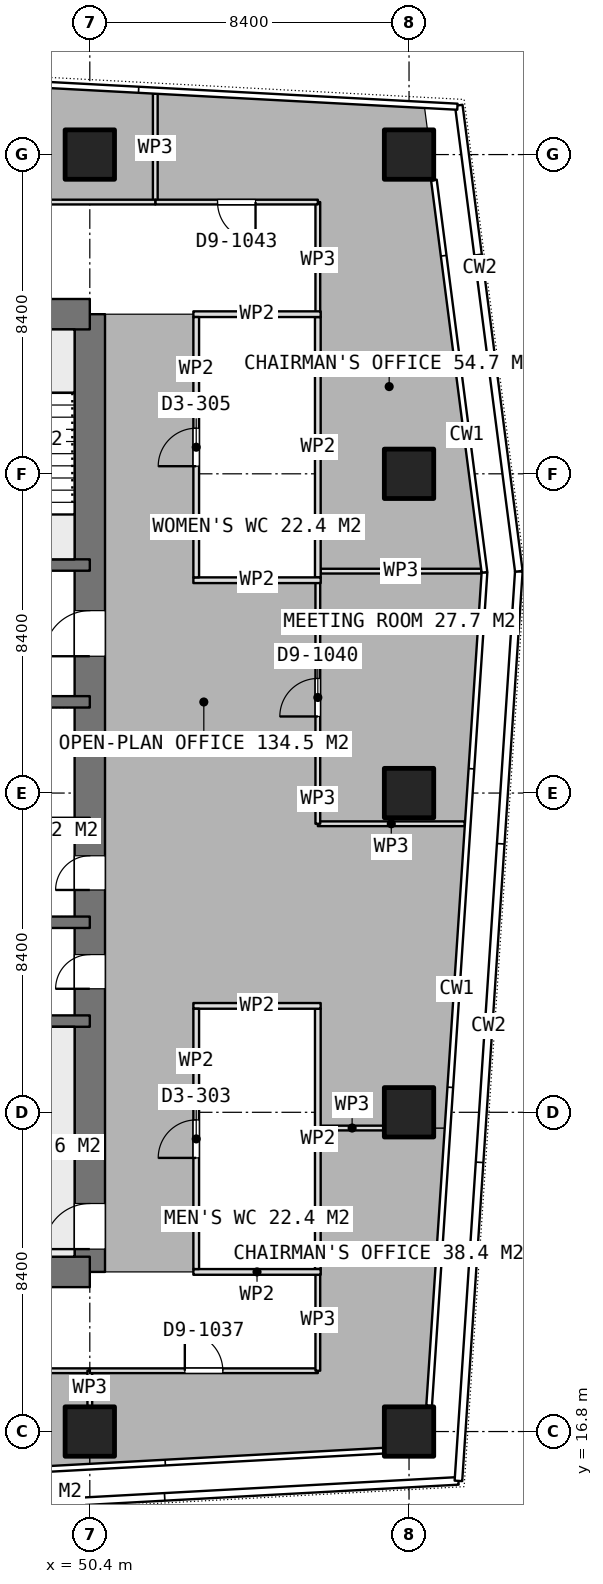
"""IFC4 building model, lengths in metres.
Left out: names, types, materials, properties, quantities, classifications, styles, units other than length and angle.
Written with IfcOpenShell. Run it as: python <this file> out.ifc"""

import sys

from ifc_helpers import new_model, si_unit, direction, frame, frame_2d, origin, origin_2d, place, context, subcontext, project, spatial, rectangle, extrude, element, fill, save


model = new_model("IFC4")
c1 = context("Model", 3, precision=1e-05, world=origin(), true_north=direction((0.0, 1.0)))
c2 = subcontext(c1, "Body", "Model", "MODEL_VIEW")
j1 = project(units=[si_unit("LENGTHUNIT", "METRE"), si_unit("PLANEANGLEUNIT", "RADIAN")], contexts=[c1])
p1 = place(None, origin())
s1 = spatial("IfcSite", under=j1, at=p1, CompositionType="ELEMENT")
p2 = place(p1, origin())
s2 = spatial("IfcBuilding", under=s1, at=p2, CompositionType="ELEMENT")
p3 = place(p2, frame((0.0, 0.0, 280.1)))
s3 = spatial("IfcBuildingStorey", under=s2, at=p3, CompositionType="ELEMENT", Elevation=280.1)
for number, where, z_axis, x_axis in (
    (1, (40.0, 21.0, 0.0), (0.0, 0.0, 1.0), (1.0, 0.0, 0.0)),
    (2, (40.0, 46.2, 0.0), (0.0, 0.0, 1.0), (1.0, 0.0, 0.0)),
):
    element("IfcWall", number, at=place(p3, frame(where, z_axis=z_axis, x_axis=x_axis)), inside=s3, PredefinedType="SHEAR", context=c2, shape_type="SweptSolid", body=[
        extrude(rectangle(XDim=10.4, YDim=0.8, at=frame_2d((5.2, 0.0))), origin(), (0.0, 0.0, 1.0), 3.75),
    ])
p4 = place(p3, frame((50.4, 21.0, 0.0), z_axis=(0.0, 0.0, 1.0), x_axis=(0.0, 1.0, 0.0)))
e3 = element("IfcWall", 3, at=p4, inside=s3, PredefinedType="SHEAR", context=c2, shape_type="SweptSolid", body=[
    extrude(rectangle(XDim=25.2, YDim=0.8, at=frame_2d((12.6, 0.0))), origin(), (0.0, 0.0, 1.0), 3.75),
])
p5 = place(p4, frame((16.2, 0.0, 0.0)))
e4 = element("IfcOpeningElement", 4, at=p5, cuts=e3, PredefinedType="OPENING", context=c2, shape_type="SweptSolid", body=[
    extrude(rectangle(XDim=1.2, YDim=2.1, at=frame_2d((0.6, 1.05))), frame((0.0, 0.41, 0.0), z_axis=(0.0, -1.0, 0.0), x_axis=(1.0, 0.0, 0.0)), (0.0, 0.0, 1.0), 0.82),
])
p6 = place(p4, frame((10.05, 0.0, 0.0)))
e5 = element("IfcOpeningElement", 5, at=p6, cuts=e3, PredefinedType="OPENING", context=c2, shape_type="SweptSolid", body=[
    extrude(rectangle(XDim=0.9, YDim=2.1, at=frame_2d((0.45, 1.05))), frame((0.0, 0.41, 0.0), z_axis=(0.0, -1.0, 0.0), x_axis=(1.0, 0.0, 0.0)), (0.0, 0.0, 1.0), 0.82),
])
p7 = place(p4, frame((7.45, 0.0, 0.0)))
e6 = element("IfcOpeningElement", 6, at=p7, cuts=e3, PredefinedType="OPENING", context=c2, shape_type="SweptSolid", body=[
    extrude(rectangle(XDim=0.9, YDim=2.1, at=frame_2d((0.45, 1.05))), frame((0.0, 0.41, 0.0), z_axis=(0.0, -1.0, 0.0), x_axis=(1.0, 0.0, 0.0)), (0.0, 0.0, 1.0), 0.82),
])
p8 = place(p4, frame((0.6, 0.0, 0.0)))
e7 = element("IfcOpeningElement", 7, at=p8, cuts=e3, PredefinedType="OPENING", context=c2, shape_type="SweptSolid", body=[
    extrude(rectangle(XDim=1.2, YDim=2.1, at=frame_2d((0.6, 1.05))), frame((0.0, 0.41, 0.0), z_axis=(0.0, -1.0, 0.0), x_axis=(1.0, 0.0, 0.0)), (0.0, 0.0, 1.0), 0.82),
])
for number, where, z_axis, x_axis in (
    (8, (43.8, 27.6, 0.0), (0.0, 0.0, 1.0), (1.0, 0.0, 0.0)),
    (9, (43.8, 30.2, 0.0), (0.0, 0.0, 1.0), (1.0, 0.0, 0.0)),
    (10, (43.8, 32.8, 0.0), (0.0, 0.0, 1.0), (1.0, 0.0, 0.0)),
):
    element("IfcWall", number, at=place(p3, frame(where, z_axis=z_axis, x_axis=x_axis)), inside=s3, PredefinedType="SHEAR", context=c2, shape_type="SweptSolid", body=[
        extrude(rectangle(XDim=6.6, YDim=0.3, at=frame_2d((3.3, 0.0))), origin(), (0.0, 0.0, 1.0), 3.75),
    ])
p9 = place(p3, frame((43.8, 36.0, 0.0), z_axis=(0.0, 0.0, 1.0), x_axis=(1.0, 0.0, 0.0)))
e11 = element("IfcWall", 11, at=p9, inside=s3, PredefinedType="SHEAR", context=c2, shape_type="SweptSolid", body=[
    extrude(rectangle(XDim=6.6, YDim=0.3, at=frame_2d((3.3, 0.0))), origin(), (0.0, 0.0, 1.0), 3.75),
])
p10 = place(p9, frame((2.65, 0.0, 0.0)))
e12 = element("IfcOpeningElement", 12, at=p10, cuts=e11, PredefinedType="OPENING", context=c2, shape_type="SweptSolid", body=[
    extrude(rectangle(XDim=1.3, YDim=2.1, at=frame_2d((0.65, 1.05))), frame((0.0, 0.16, 0.0), z_axis=(0.0, -1.0, 0.0), x_axis=(1.0, 0.0, 0.0)), (0.0, 0.0, 1.0), 0.32),
])
p11 = place(p3, frame((43.8, 39.6, 0.0), z_axis=(0.0, 0.0, 1.0), x_axis=(1.0, 0.0, 0.0)))
e13 = element("IfcWall", 13, at=p11, inside=s3, PredefinedType="SHEAR", context=c2, shape_type="SweptSolid", body=[
    extrude(rectangle(XDim=6.6, YDim=0.3, at=frame_2d((3.3, 0.0))), origin(), (0.0, 0.0, 1.0), 3.75),
])
p12 = place(p11, frame((0.35, 0.0, 0.0)))
e14 = element("IfcOpeningElement", 14, at=p12, cuts=e13, PredefinedType="OPENING", context=c2, shape_type="SweptSolid", body=[
    extrude(rectangle(XDim=1.2, YDim=2.1, at=frame_2d((0.6, 1.05))), frame((0.0, 0.16, 0.0), z_axis=(0.0, -1.0, 0.0), x_axis=(1.0, 0.0, 0.0)), (0.0, 0.0, 1.0), 0.32),
])
for number, where, z_axis, x_axis in (
    (15, (50.4, 16.8, 0.0), (0.0, 0.0, 1.0), (1.0, 0.0, 0.0)),
    (16, (50.4, 50.4, 0.0), (0.0, 0.0, 1.0), (1.0, 0.0, 0.0)),
    (17, (58.8, 16.8, 0.0), (0.0, 0.0, 1.0), (1.0, 0.0, 0.0)),
    (18, (58.8, 25.2, 0.0), (0.0, 0.0, 1.0), (1.0, 0.0, 0.0)),
    (19, (58.8, 33.6, 0.0), (0.0, 0.0, 1.0), (1.0, 0.0, 0.0)),
    (20, (58.8, 42.0, 0.0), (0.0, 0.0, 1.0), (1.0, 0.0, 0.0)),
    (21, (58.8, 50.4, 0.0), (0.0, 0.0, 1.0), (1.0, 0.0, 0.0)),
):
    element("IfcColumn", number, at=place(p3, frame(where, z_axis=z_axis, x_axis=x_axis)), inside=s3, PredefinedType="COLUMN", context=c2, shape_type="SweptSolid", body=[
        extrude(rectangle(XDim=1.3, YDim=1.3, at=origin_2d()), origin(), (0.0, 0.0, 1.0), 3.75),
    ])
for number, where, z_axis, x_axis in (
    (22, (53.125, 39.2, 0.0), (0.0, 0.0, 1.0), (1.0, 0.0, 0.0)),
    (23, (53.125, 46.2, 0.0), (0.0, 0.0, 1.0), (1.0, 0.0, 0.0)),
):
    element("IfcWall", number, at=place(p3, frame(where, z_axis=z_axis, x_axis=x_axis)), inside=s3, PredefinedType="PARTITIONING", context=c2, shape_type="SweptSolid", body=[
        extrude(rectangle(XDim=3.35, YDim=0.15, at=frame_2d((1.675, 0.0))), origin(), (0.0, 0.0, 1.0), 3.5),
    ])
p13 = place(p3, frame((53.2, 39.275, 0.0), z_axis=(0.0, 0.0, 1.0), x_axis=(0.0, 1.0, 0.0)))
e24 = element("IfcWall", 24, at=p13, inside=s3, PredefinedType="PARTITIONING", context=c2, shape_type="SweptSolid", body=[
    extrude(rectangle(XDim=6.85, YDim=0.15, at=frame_2d((3.425, 0.0))), origin(), (0.0, 0.0, 1.0), 3.5),
])
p14 = place(p13, frame((2.925, 0.0, 0.0)))
e25 = element("IfcOpeningElement", 25, at=p14, cuts=e24, PredefinedType="OPENING", context=c2, shape_type="SweptSolid", body=[
    extrude(rectangle(XDim=1.0, YDim=2.1, at=frame_2d((0.5, 1.05))), frame((0.0, 0.085, 0.0), z_axis=(0.0, -1.0, 0.0), x_axis=(1.0, 0.0, 0.0)), (0.0, 0.0, 1.0), 0.17),
])
p15 = place(p3, frame((56.4, 39.275, 0.0), z_axis=(0.0, 0.0, 1.0), x_axis=(0.0, 1.0, 0.0)))
e26 = element("IfcWall", 26, at=p15, inside=s3, PredefinedType="PARTITIONING", context=c2, shape_type="SweptSolid", body=[
    extrude(rectangle(XDim=6.85, YDim=0.15, at=frame_2d((3.425, 0.0))), origin(), (0.0, 0.0, 1.0), 3.5),
])
for number, where, z_axis, x_axis in (
    (27, (53.125, 21.0, 0.0), (0.0, 0.0, 1.0), (1.0, 0.0, 0.0)),
    (28, (53.125, 28.0, 0.0), (0.0, 0.0, 1.0), (1.0, 0.0, 0.0)),
):
    element("IfcWall", number, at=place(p3, frame(where, z_axis=z_axis, x_axis=x_axis)), inside=s3, PredefinedType="PARTITIONING", context=c2, shape_type="SweptSolid", body=[
        extrude(rectangle(XDim=3.35, YDim=0.15, at=frame_2d((1.675, 0.0))), origin(), (0.0, 0.0, 1.0), 3.5),
    ])
p16 = place(p3, frame((53.2, 21.075, 0.0), z_axis=(0.0, 0.0, 1.0), x_axis=(0.0, 1.0, 0.0)))
e29 = element("IfcWall", 29, at=p16, inside=s3, PredefinedType="PARTITIONING", context=c2, shape_type="SweptSolid", body=[
    extrude(rectangle(XDim=6.85, YDim=0.15, at=frame_2d((3.425, 0.0))), origin(), (0.0, 0.0, 1.0), 3.5),
])
p17 = place(p16, frame((2.925, 0.0, 0.0)))
e30 = element("IfcOpeningElement", 30, at=p17, cuts=e29, PredefinedType="OPENING", context=c2, shape_type="SweptSolid", body=[
    extrude(rectangle(XDim=1.0, YDim=2.1, at=frame_2d((0.5, 1.05))), frame((0.0, 0.085, 0.0), z_axis=(0.0, -1.0, 0.0), x_axis=(1.0, 0.0, 0.0)), (0.0, 0.0, 1.0), 0.17),
])
p18 = place(p3, frame((56.4, 21.075, 0.0), z_axis=(0.0, 0.0, 1.0), x_axis=(0.0, 1.0, 0.0)))
e31 = element("IfcWall", 31, at=p18, inside=s3, PredefinedType="PARTITIONING", context=c2, shape_type="SweptSolid", body=[
    extrude(rectangle(XDim=6.85, YDim=0.15, at=frame_2d((3.425, 0.0))), origin(), (0.0, 0.0, 1.0), 3.5),
])
p19 = place(p3, frame((60.266, 32.792, 0.0), z_axis=(0.0, 0.0, 1.0), x_axis=(-1.0, 0.0, 0.0)))
e32 = element("IfcWall", 32, at=p19, inside=s3, PredefinedType="PARTITIONING", context=c2, shape_type="SweptSolid", body=[
    extrude(rectangle(XDim=3.866, YDim=0.125, at=frame_2d((1.933, 0.0))), origin(), (0.0, 0.0, 1.0), 3.5),
])
p20 = place(p3, frame((56.4, 32.792, 0.0), z_axis=(0.0, 0.0, 1.0), x_axis=(0.0, 1.0, 0.0)))
e33 = element("IfcWall", 33, at=p20, inside=s3, PredefinedType="PARTITIONING", context=c2, shape_type="SweptSolid", body=[
    extrude(rectangle(XDim=6.482, YDim=0.125, at=frame_2d((3.241, 0.0))), origin(), (0.0, 0.0, 1.0), 3.5),
])
p21 = place(p20, frame((2.823, 0.0, 0.0)))
e34 = element("IfcOpeningElement", 34, at=p21, cuts=e33, PredefinedType="OPENING", context=c2, shape_type="SweptSolid", body=[
    extrude(rectangle(XDim=1.0, YDim=2.1, at=frame_2d((0.5, 1.05))), frame((0.0, 0.073, 0.0), z_axis=(0.0, -1.0, 0.0), x_axis=(1.0, 0.0, 0.0)), (0.0, 0.0, 1.0), 0.145),
])
p22 = place(p3, frame((56.475, 39.439, 0.0), z_axis=(0.0, 0.0, 1.0), x_axis=(1.0, 0.0, 0.0)))
e35 = element("IfcWall", 35, at=p22, inside=s3, PredefinedType="PARTITIONING", context=c2, shape_type="SweptSolid", body=[
    extrude(rectangle(XDim=4.225, YDim=0.125, at=frame_2d((2.112, 0.0))), origin(), (0.0, 0.0, 1.0), 3.5),
])
p23 = place(p3, frame((52.123, 49.15, 0.0), z_axis=(0.0, 0.0, 1.0), x_axis=(0.0, 1.0, 0.0)))
e36 = element("IfcWall", 36, at=p23, inside=s3, PredefinedType="PARTITIONING", context=c2, shape_type="SweptSolid", body=[
    extrude(rectangle(XDim=2.852, YDim=0.125, at=frame_2d((1.426, 0.0))), origin(), (0.0, 0.0, 1.0), 3.5),
])
p24 = place(p3, frame((56.4, 46.125, 0.0), z_axis=(0.0, 0.0, 1.0), x_axis=(0.0, 1.0, 0.0)))
e37 = element("IfcWall", 37, at=p24, inside=s3, PredefinedType="PARTITIONING", context=c2, shape_type="SweptSolid", body=[
    extrude(rectangle(XDim=3.025, YDim=0.125, at=frame_2d((1.512, 0.0))), origin(), (0.0, 0.0, 1.0), 3.5),
])
p25 = place(p3, frame((56.4, 49.15, 0.0), z_axis=(0.0, 0.0, 1.0), x_axis=(-1.0, 0.0, 0.0)))
e38 = element("IfcWall", 38, at=p25, inside=s3, PredefinedType="PARTITIONING", context=c2, shape_type="SweptSolid", body=[
    extrude(rectangle(XDim=4.277, YDim=0.125, at=frame_2d((2.138, 0.0))), origin(), (0.0, 0.0, 1.0), 3.5),
])
p26 = place(p25, frame((1.639, 0.0, 0.0)))
e39 = element("IfcOpeningElement", 39, at=p26, cuts=e38, PredefinedType="OPENING", context=c2, shape_type="SweptSolid", body=[
    extrude(rectangle(XDim=1.0, YDim=2.1, at=frame_2d((0.5, 1.05))), frame((0.0, 0.073, 0.0), z_axis=(0.0, -1.0, 0.0), x_axis=(1.0, 0.0, 0.0)), (0.0, 0.0, 1.0), 0.145),
])
p27 = place(p3, frame((52.123, 49.15, 0.0), z_axis=(0.0, 0.0, 1.0), x_axis=(-1.0, 0.0, 0.0)))
e40 = element("IfcWall", 40, at=p27, inside=s3, PredefinedType="PARTITIONING", context=c2, shape_type="SweptSolid", body=[
    extrude(rectangle(XDim=17.705, YDim=0.125, at=frame_2d((8.853, 0.0))), origin(), (0.0, 0.0, 1.0), 3.5),
])
p28 = place(p27, frame((7.553, 0.0, 0.0)))
e41 = element("IfcOpeningElement", 41, at=p28, cuts=e40, PredefinedType="OPENING", context=c2, shape_type="SweptSolid", body=[
    extrude(rectangle(XDim=1.8, YDim=2.1, at=frame_2d((0.9, 1.05))), frame((0.0, 0.073, 0.0), z_axis=(0.0, -1.0, 0.0), x_axis=(1.0, 0.0, 0.0)), (0.0, 0.0, 1.0), 0.145),
])
p29 = place(p3, frame((42.674, 18.4, 0.0), z_axis=(0.0, 0.0, 1.0), x_axis=(1.0, 0.0, 0.0)))
e42 = element("IfcWall", 42, at=p29, inside=s3, PredefinedType="PARTITIONING", context=c2, shape_type="SweptSolid", body=[
    extrude(rectangle(XDim=7.726, YDim=0.125, at=frame_2d((3.863, 0.0))), origin(), (0.0, 0.0, 1.0), 3.5),
])
p30 = place(p29, frame((3.363, 0.0, 0.0)))
e43 = element("IfcOpeningElement", 43, at=p30, cuts=e42, PredefinedType="OPENING", context=c2, shape_type="SweptSolid", body=[
    extrude(rectangle(XDim=1.0, YDim=2.1, at=frame_2d((0.5, 1.05))), frame((0.0, 0.073, 0.0), z_axis=(0.0, -1.0, 0.0), x_axis=(1.0, 0.0, 0.0)), (0.0, 0.0, 1.0), 0.145),
])
p31 = place(p3, frame((50.4, 18.4, 0.0), z_axis=(0.0, 0.0, 1.0), x_axis=(0.0, -1.0, 0.0)))
e44 = element("IfcWall", 44, at=p31, inside=s3, PredefinedType="PARTITIONING", context=c2, shape_type="SweptSolid", body=[
    extrude(rectangle(XDim=0.93, YDim=0.125, at=frame_2d((0.465, 0.0))), origin(), (0.0, 0.0, 1.0), 3.5),
])
p32 = place(p3, frame((56.475, 24.786, 0.0), z_axis=(0.0, 0.0, 1.0), x_axis=(1.0, 0.0, 0.0)))
e45 = element("IfcWall", 45, at=p32, inside=s3, PredefinedType="PARTITIONING", context=c2, shape_type="SweptSolid", body=[
    extrude(rectangle(XDim=1.655, YDim=0.125, at=frame_2d((0.827, 0.0))), origin(), (0.0, 0.0, 1.0), 3.5),
])
p33 = place(p3, frame((50.401, 18.4, 0.0), z_axis=(0.0, 0.0, 1.0), x_axis=(1.0, 0.0, 0.0)))
e46 = element("IfcWall", 46, at=p33, inside=s3, PredefinedType="PARTITIONING", context=c2, shape_type="SweptSolid", body=[
    extrude(rectangle(XDim=5.999, YDim=0.125, at=frame_2d((3.0, 0.0))), origin(), (0.0, 0.0, 1.0), 3.5),
])
p34 = place(p33, frame((2.499, 0.0, 0.0)))
e47 = element("IfcOpeningElement", 47, at=p34, cuts=e46, PredefinedType="OPENING", context=c2, shape_type="SweptSolid", body=[
    extrude(rectangle(XDim=1.0, YDim=2.1, at=frame_2d((0.5, 1.05))), frame((0.0, 0.073, 0.0), z_axis=(0.0, -1.0, 0.0), x_axis=(1.0, 0.0, 0.0)), (0.0, 0.0, 1.0), 0.145),
])
p35 = place(p3, frame((56.4, 18.4, 0.0), z_axis=(0.0, 0.0, 1.0), x_axis=(0.0, 1.0, 0.0)))
e48 = element("IfcWall", 48, at=p35, inside=s3, PredefinedType="PARTITIONING", context=c2, shape_type="SweptSolid", body=[
    extrude(rectangle(XDim=2.675, YDim=0.125, at=frame_2d((1.337, 0.0))), origin(), (0.0, 0.0, 1.0), 3.5),
])
p36 = place(p5, origin())
e49 = element("IfcDoor", 49, at=p36, inside=s3, OperationType="SINGLE_SWING_LEFT", PredefinedType="DOOR", context=c2, shape_type="SweptSolid", body=[
    extrude(rectangle(XDim=1.2, YDim=2.1, at=frame_2d((0.6, 1.05))), frame((0.0, 0.025, 0.0), z_axis=(0.0, -1.0, 0.0), x_axis=(1.0, 0.0, 0.0)), (0.0, 0.0, 1.0), 0.05),
])
fill(e4, e49)
p37 = place(p6, origin())
e50 = element("IfcDoor", 50, at=p37, inside=s3, OperationType="SINGLE_SWING_LEFT", PredefinedType="DOOR", context=c2, shape_type="SweptSolid", body=[
    extrude(rectangle(XDim=0.9, YDim=2.1, at=frame_2d((0.45, 1.05))), frame((0.0, 0.025, 0.0), z_axis=(0.0, -1.0, 0.0), x_axis=(1.0, 0.0, 0.0)), (0.0, 0.0, 1.0), 0.05),
])
fill(e5, e50)
p38 = place(p7, origin())
e51 = element("IfcDoor", 51, at=p38, inside=s3, OperationType="SINGLE_SWING_LEFT", PredefinedType="DOOR", context=c2, shape_type="SweptSolid", body=[
    extrude(rectangle(XDim=0.9, YDim=2.1, at=frame_2d((0.45, 1.05))), frame((0.0, 0.025, 0.0), z_axis=(0.0, -1.0, 0.0), x_axis=(1.0, 0.0, 0.0)), (0.0, 0.0, 1.0), 0.05),
])
fill(e6, e51)
p39 = place(p14, origin())
e52 = element("IfcDoor", 52, at=p39, inside=s3, OperationType="SINGLE_SWING_LEFT", PredefinedType="DOOR", context=c2, shape_type="SweptSolid", body=[
    extrude(rectangle(XDim=1.0, YDim=2.1, at=frame_2d((0.5, 1.05))), frame((0.0, 0.025, 0.0), z_axis=(0.0, -1.0, 0.0), x_axis=(1.0, 0.0, 0.0)), (0.0, 0.0, 1.0), 0.05),
])
fill(e25, e52)
p40 = place(p17, origin())
e53 = element("IfcDoor", 53, at=p40, inside=s3, OperationType="SINGLE_SWING_LEFT", PredefinedType="DOOR", context=c2, shape_type="SweptSolid", body=[
    extrude(rectangle(XDim=1.0, YDim=2.1, at=frame_2d((0.5, 1.05))), frame((0.0, 0.025, 0.0), z_axis=(0.0, -1.0, 0.0), x_axis=(1.0, 0.0, 0.0)), (0.0, 0.0, 1.0), 0.05),
])
fill(e30, e53)
p41 = place(p21, origin())
e54 = element("IfcDoor", 54, at=p41, inside=s3, OperationType="SINGLE_SWING_LEFT", PredefinedType="DOOR", context=c2, shape_type="SweptSolid", body=[
    extrude(rectangle(XDim=1.0, YDim=2.1, at=frame_2d((0.5, 1.05))), frame((0.0, 0.025, 0.0), z_axis=(0.0, -1.0, 0.0), x_axis=(1.0, 0.0, 0.0)), (0.0, 0.0, 1.0), 0.05),
])
fill(e34, e54)
p42 = place(p26, origin())
e55 = element("IfcDoor", 55, at=p42, inside=s3, OperationType="SINGLE_SWING_LEFT", PredefinedType="DOOR", context=c2, shape_type="SweptSolid", body=[
    extrude(rectangle(XDim=1.0, YDim=2.1, at=frame_2d((0.5, 1.05))), frame((0.0, 0.025, 0.0), z_axis=(0.0, -1.0, 0.0), x_axis=(1.0, 0.0, 0.0)), (0.0, 0.0, 1.0), 0.05),
])
fill(e39, e55)
p43 = place(p34, origin())
e56 = element("IfcDoor", 56, at=p43, inside=s3, OperationType="SINGLE_SWING_LEFT", PredefinedType="DOOR", context=c2, shape_type="SweptSolid", body=[
    extrude(rectangle(XDim=1.0, YDim=2.1, at=frame_2d((0.5, 1.05))), frame((0.0, 0.025, 0.0), z_axis=(0.0, -1.0, 0.0), x_axis=(1.0, 0.0, 0.0)), (0.0, 0.0, 1.0), 0.05),
])
fill(e47, e56)
p44 = place(p8, origin())
e57 = element("IfcDoor", 57, at=p44, inside=s3, OperationType="SINGLE_SWING_RIGHT", PredefinedType="DOOR", context=c2, shape_type="SweptSolid", body=[
    extrude(rectangle(XDim=1.2, YDim=2.1, at=frame_2d((0.6, 1.05))), frame((0.0, 0.025, 0.0), z_axis=(0.0, -1.0, 0.0), x_axis=(1.0, 0.0, 0.0)), (0.0, 0.0, 1.0), 0.05),
])
fill(e7, e57)
save(model, sys.argv[1])
